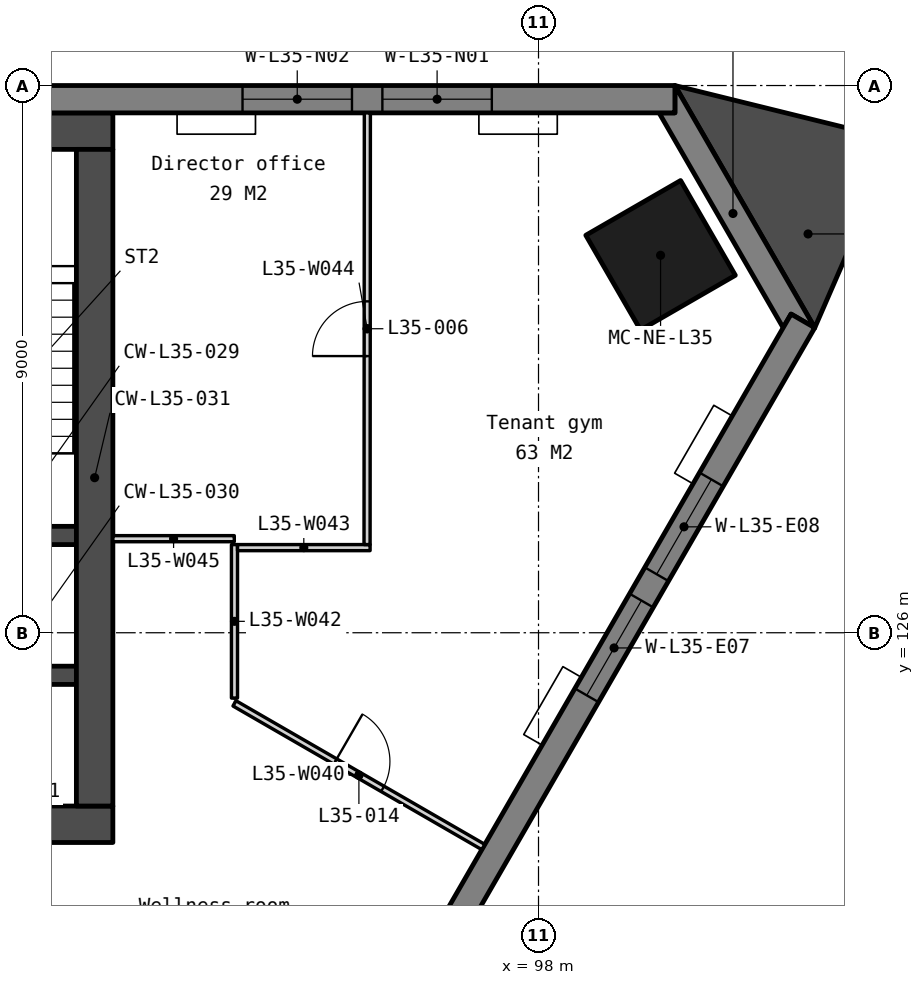
"""IFC4 building model, lengths in metres.
Left out: names, types, materials, properties, quantities, classifications, styles, units other than length and angle.
Written with IfcOpenShell. Run it as: python <this file> out.ifc"""

import sys

from ifc_helpers import new_model, si_unit, direction, frame, frame_2d, origin, origin_2d, place, context, subcontext, project, spatial, polyline, rectangle, outline, extrude, element, fill, save


model = new_model("IFC4")
c1 = context("Model", 3, precision=1e-05, world=origin(), true_north=direction((0.0, 1.0)))
c2 = subcontext(c1, "Body", "Model", "MODEL_VIEW")
j1 = project(units=[si_unit("LENGTHUNIT", "METRE"), si_unit("PLANEANGLEUNIT", "RADIAN")], contexts=[c1])
p1 = place(None, origin())
s1 = spatial("IfcSite", under=j1, at=p1, CompositionType="ELEMENT")
p2 = place(p1, origin())
s2 = spatial("IfcBuilding", under=s1, at=p2, CompositionType="ELEMENT")
p3 = place(p2, frame((0.0, 0.0, 140.3)))
s3 = spatial("IfcBuildingStorey", under=s2, at=p3, CompositionType="ELEMENT", Elevation=140.3)
p4 = place(p3, frame((100.007, 132.208, 0.0), z_axis=(0.0, 0.0, 1.0), x_axis=(-0.5, 0.866025403784, 0.0)))
e1 = element("IfcColumn", 1, at=p4, inside=s3, PredefinedType="COLUMN", context=c2, shape_type="SweptSolid", body=[
    extrude(rectangle(XDim=1.8, YDim=1.8, at=origin_2d()), origin(), (0.0, 0.0, 1.0), 3.9),
])
p5 = place(p3, frame((69.0, 134.25, 0.0), z_axis=(0.0, 0.0, 1.0), x_axis=(1.0, 0.0, 0.0)))
e2 = element("IfcWall", 2, at=p5, inside=s3, PredefinedType="SOLIDWALL", context=c2, shape_type="SweptSolid", body=[
    extrude(rectangle(XDim=22.0, YDim=0.6, at=frame_2d((11.0, 0.0))), origin(), (0.0, 0.0, 1.0), 3.75),
])
p6 = place(p3, frame((69.0, 122.85, 0.0), z_axis=(0.0, 0.0, 1.0), x_axis=(1.0, 0.0, 0.0)))
e3 = element("IfcWall", 3, at=p6, inside=s3, PredefinedType="SOLIDWALL", context=c2, shape_type="SweptSolid", body=[
    extrude(rectangle(XDim=22.0, YDim=0.6, at=frame_2d((11.0, 0.0))), origin(), (0.0, 0.0, 1.0), 3.75),
])
p7 = place(p6, frame((16.375, 0.0, 0.0)))
e4 = element("IfcOpeningElement", 4, at=p7, cuts=e3, PredefinedType="OPENING", context=c2, shape_type="SweptSolid", body=[
    extrude(rectangle(XDim=1.8, YDim=2.1, at=frame_2d((0.9, 1.05))), frame((0.0, 0.31, 0.0), z_axis=(0.0, -1.0, 0.0), x_axis=(1.0, 0.0, 0.0)), (0.0, 0.0, 1.0), 0.62),
])
p8 = place(p6, frame((3.825, 0.0, 0.0)))
e5 = element("IfcOpeningElement", 5, at=p8, cuts=e3, PredefinedType="OPENING", context=c2, shape_type="SweptSolid", body=[
    extrude(rectangle(XDim=1.8, YDim=2.1, at=frame_2d((0.9, 1.05))), frame((0.0, 0.31, 0.0), z_axis=(0.0, -1.0, 0.0), x_axis=(1.0, 0.0, 0.0)), (0.0, 0.0, 1.0), 0.62),
])
p9 = place(p6, frame((12.85, 0.0, 0.0)))
e6 = element("IfcOpeningElement", 6, at=p9, cuts=e3, PredefinedType="OPENING", context=c2, shape_type="SweptSolid", body=[
    extrude(rectangle(XDim=1.5, YDim=2.1, at=frame_2d((0.75, 1.05))), frame((0.0, 0.31, 0.0), z_axis=(0.0, -1.0, 0.0), x_axis=(1.0, 0.0, 0.0)), (0.0, 0.0, 1.0), 0.62),
])
for number, where, z_axis, x_axis in (
    (7, (87.85, 127.6, 0.0), (0.0, 0.0, 1.0), (1.0, 0.0, 0.0)),
    (8, (87.85, 125.3, 0.0), (0.0, 0.0, 1.0), (1.0, 0.0, 0.0)),
):
    element("IfcWall", number, at=place(p3, frame(where, z_axis=z_axis, x_axis=x_axis)), inside=s3, PredefinedType="SOLIDWALL", context=c2, shape_type="SweptSolid", body=[
        extrude(rectangle(XDim=2.55, YDim=0.3, at=frame_2d((1.275, 0.0))), origin(), (0.0, 0.0, 1.0), 3.75),
    ])
p10 = place(p3, frame((90.7, 133.95, 0.0), z_axis=(0.0, 0.0, 1.0), x_axis=(0.0, -1.0, 0.0)))
e9 = element("IfcWall", 9, at=p10, inside=s3, PredefinedType="SOLIDWALL", context=c2, shape_type="SweptSolid", body=[
    extrude(rectangle(XDim=10.8, YDim=0.6, at=frame_2d((5.4, 0.0))), origin(), (0.0, 0.0, 1.0), 3.75),
])
p11 = place(p3, frame((0.0, 0.0, -0.15)))
e10 = element("IfcWall", 10, at=p11, inside=s3, PredefinedType="SOLIDWALL", context=c2, shape_type="SweptSolid", body=[
    extrude(outline(polyline([(102.543, 131.016), (102.153, 131.241), (102.023, 131.016), (99.983, 134.55), (100.243, 134.55), (100.243, 135.0), (102.543, 131.016)])), origin(), (0.0, 0.0, 1.0), 3.9),
])
p12 = place(p3, frame((100.243, 134.775, -0.15), z_axis=(0.0, 0.0, 1.0), x_axis=(-1.0, 0.0, 0.0)))
e11 = element("IfcWall", 11, at=p12, inside=s3, PredefinedType="SOLIDWALL", context=c2, shape_type="SweptSolid", body=[
    extrude(outline(polyline([(0.0, 0.0), (0.0, 3.9), (33.425, 3.9), (33.425, 0.0), (0.0, 0.0)])), frame((0.0, 0.225, 0.0), z_axis=(0.0, -1.0, 0.0), x_axis=(1.0, 0.0, 0.0)), (0.0, 0.0, 1.0), 0.45),
])
p13 = place(p12, frame((3.011, 0.0, 0.95)))
e12 = element("IfcOpeningElement", 12, at=p13, cuts=e11, PredefinedType="OPENING", context=c2, shape_type="SweptSolid", body=[
    extrude(rectangle(XDim=1.8, YDim=2.2, at=frame_2d((0.9, 1.1))), frame((0.0, 0.235, 0.0), z_axis=(0.0, -1.0, 0.0), x_axis=(1.0, 0.0, 0.0)), (0.0, 0.0, 1.0), 0.47),
])
p14 = place(p12, frame((5.311, 0.0, 0.95)))
e13 = element("IfcOpeningElement", 13, at=p14, cuts=e11, PredefinedType="OPENING", context=c2, shape_type="SweptSolid", body=[
    extrude(rectangle(XDim=1.8, YDim=2.2, at=frame_2d((0.9, 1.1))), frame((0.0, 0.235, 0.0), z_axis=(0.0, -1.0, 0.0), x_axis=(1.0, 0.0, 0.0)), (0.0, 0.0, 1.0), 0.47),
])
p15 = place(p12, frame((13.132, 0.0, 0.95)))
e14 = element("IfcOpeningElement", 14, at=p15, cuts=e11, PredefinedType="OPENING", context=c2, shape_type="SweptSolid", body=[
    extrude(rectangle(XDim=1.8, YDim=2.2, at=frame_2d((0.9, 1.1))), frame((0.0, 0.235, 0.0), z_axis=(0.0, -1.0, 0.0), x_axis=(1.0, 0.0, 0.0)), (0.0, 0.0, 1.0), 0.47),
])
p16 = place(p12, frame((15.432, 0.0, 0.95)))
e15 = element("IfcOpeningElement", 15, at=p16, cuts=e11, PredefinedType="OPENING", context=c2, shape_type="SweptSolid", body=[
    extrude(rectangle(XDim=1.8, YDim=2.2, at=frame_2d((0.9, 1.1))), frame((0.0, 0.235, 0.0), z_axis=(0.0, -1.0, 0.0), x_axis=(1.0, 0.0, 0.0)), (0.0, 0.0, 1.0), 0.47),
])
p17 = place(p12, frame((23.254, 0.0, 0.95)))
e16 = element("IfcOpeningElement", 16, at=p17, cuts=e11, PredefinedType="OPENING", context=c2, shape_type="SweptSolid", body=[
    extrude(rectangle(XDim=1.8, YDim=2.2, at=frame_2d((0.9, 1.1))), frame((0.0, 0.235, 0.0), z_axis=(0.0, -1.0, 0.0), x_axis=(1.0, 0.0, 0.0)), (0.0, 0.0, 1.0), 0.47),
])
p18 = place(p12, frame((25.554, 0.0, 0.95)))
e17 = element("IfcOpeningElement", 17, at=p18, cuts=e11, PredefinedType="OPENING", context=c2, shape_type="SweptSolid", body=[
    extrude(rectangle(XDim=1.8, YDim=2.2, at=frame_2d((0.9, 1.1))), frame((0.0, 0.235, 0.0), z_axis=(0.0, -1.0, 0.0), x_axis=(1.0, 0.0, 0.0)), (0.0, 0.0, 1.0), 0.47),
])
p19 = place(p3, frame((82.105, 96.067, -0.15), z_axis=(0.0, 0.0, 1.0), x_axis=(0.499997369791, 0.866026922331, 0.0)))
e18 = element("IfcWall", 18, at=p19, inside=s3, PredefinedType="SOLIDWALL", context=c2, shape_type="SweptSolid", body=[
    extrude(outline(polyline([(40.486, 0.0), (40.486, 3.9), (0.0, 3.9), (0.0, 0.0), (40.486, 0.0)])), frame((0.0, 0.225, 0.0), z_axis=(0.0, -1.0, 0.0), x_axis=(1.0, 0.0, 0.0)), (0.0, 0.0, 1.0), 0.45),
])
p20 = place(p19, frame((3.011, 0.0, 0.95)))
e19 = element("IfcOpeningElement", 19, at=p20, cuts=e18, PredefinedType="OPENING", context=c2, shape_type="SweptSolid", body=[
    extrude(rectangle(XDim=1.8, YDim=2.2, at=frame_2d((0.9, 1.1))), frame((0.0, 0.235, 0.0), z_axis=(0.0, -1.0, 0.0), x_axis=(1.0, 0.0, 0.0)), (0.0, 0.0, 1.0), 0.47),
])
p21 = place(p19, frame((5.311, 0.0, 0.95)))
e20 = element("IfcOpeningElement", 20, at=p21, cuts=e18, PredefinedType="OPENING", context=c2, shape_type="SweptSolid", body=[
    extrude(rectangle(XDim=1.8, YDim=2.2, at=frame_2d((0.9, 1.1))), frame((0.0, 0.235, 0.0), z_axis=(0.0, -1.0, 0.0), x_axis=(1.0, 0.0, 0.0)), (0.0, 0.0, 1.0), 0.47),
])
p22 = place(p19, frame((13.132, 0.0, 0.95)))
e21 = element("IfcOpeningElement", 21, at=p22, cuts=e18, PredefinedType="OPENING", context=c2, shape_type="SweptSolid", body=[
    extrude(rectangle(XDim=1.8, YDim=2.2, at=frame_2d((0.9, 1.1))), frame((0.0, 0.235, 0.0), z_axis=(0.0, -1.0, 0.0), x_axis=(1.0, 0.0, 0.0)), (0.0, 0.0, 1.0), 0.47),
])
p23 = place(p19, frame((15.432, 0.0, 0.95)))
e22 = element("IfcOpeningElement", 22, at=p23, cuts=e18, PredefinedType="OPENING", context=c2, shape_type="SweptSolid", body=[
    extrude(rectangle(XDim=1.8, YDim=2.2, at=frame_2d((0.9, 1.1))), frame((0.0, 0.235, 0.0), z_axis=(0.0, -1.0, 0.0), x_axis=(1.0, 0.0, 0.0)), (0.0, 0.0, 1.0), 0.47),
])
p24 = place(p19, frame((23.254, 0.0, 0.95)))
e23 = element("IfcOpeningElement", 23, at=p24, cuts=e18, PredefinedType="OPENING", context=c2, shape_type="SweptSolid", body=[
    extrude(rectangle(XDim=1.8, YDim=2.2, at=frame_2d((0.9, 1.1))), frame((0.0, 0.235, 0.0), z_axis=(0.0, -1.0, 0.0), x_axis=(1.0, 0.0, 0.0)), (0.0, 0.0, 1.0), 0.47),
])
p25 = place(p19, frame((25.554, 0.0, 0.95)))
e24 = element("IfcOpeningElement", 24, at=p25, cuts=e18, PredefinedType="OPENING", context=c2, shape_type="SweptSolid", body=[
    extrude(rectangle(XDim=1.8, YDim=2.2, at=frame_2d((0.9, 1.1))), frame((0.0, 0.235, 0.0), z_axis=(0.0, -1.0, 0.0), x_axis=(1.0, 0.0, 0.0)), (0.0, 0.0, 1.0), 0.47),
])
p26 = place(p19, frame((33.375, 0.0, 0.95)))
e25 = element("IfcOpeningElement", 25, at=p26, cuts=e18, PredefinedType="OPENING", context=c2, shape_type="SweptSolid", body=[
    extrude(rectangle(XDim=1.8, YDim=2.2, at=frame_2d((0.9, 1.1))), frame((0.0, 0.235, 0.0), z_axis=(0.0, -1.0, 0.0), x_axis=(1.0, 0.0, 0.0)), (0.0, 0.0, 1.0), 0.47),
])
p27 = place(p19, frame((35.675, 0.0, 0.95)))
e26 = element("IfcOpeningElement", 26, at=p27, cuts=e18, PredefinedType="OPENING", context=c2, shape_type="SweptSolid", body=[
    extrude(rectangle(XDim=1.8, YDim=2.2, at=frame_2d((0.9, 1.1))), frame((0.0, 0.235, 0.0), z_axis=(0.0, -1.0, 0.0), x_axis=(1.0, 0.0, 0.0)), (0.0, 0.0, 1.0), 0.47),
])
p28 = place(p3, frame((0.0, 0.0, -0.15)))
e27 = element("IfcWall", 27, at=p28, inside=s3, PredefinedType="SOLIDWALL", context=c2, shape_type="SweptSolid", body=[
    extrude(outline(polyline([(102.543, 131.016), (103.884, 134.102), (100.243, 135.0), (102.543, 131.016)])), origin(), (0.0, 0.0, 1.0), 3.9),
])
p29 = place(p3, frame((93.0, 124.839, 0.0), z_axis=(0.0, 0.0, 1.0), x_axis=(0.866028145587, -0.499995251029, 0.0)))
e28 = element("IfcWall", 28, at=p29, inside=s3, PredefinedType="PARTITIONING", context=c2, shape_type="SweptSolid", body=[
    extrude(rectangle(XDim=4.726, YDim=0.1, at=frame_2d((2.363, 0.0))), origin(), (0.0, 0.0, 1.0), 3.75),
])
p30 = place(p29, frame((1.913, 0.0, 0.0)))
e29 = element("IfcOpeningElement", 29, at=p30, cuts=e28, PredefinedType="OPENING", context=c2, shape_type="SweptSolid", body=[
    extrude(rectangle(XDim=0.9, YDim=2.1, at=frame_2d((0.45, 1.05))), frame((0.0, 0.06, 0.0), z_axis=(0.0, -1.0, 0.0), x_axis=(1.0, 0.0, 0.0)), (0.0, 0.0, 1.0), 0.12),
])
p31 = place(p3, frame((93.0, 124.925, 0.0), z_axis=(0.0, 0.0, 1.0), x_axis=(0.0, 1.0, 0.0)))
e30 = element("IfcWall", 30, at=p31, inside=s3, PredefinedType="PARTITIONING", context=c2, shape_type="SweptSolid", body=[
    extrude(rectangle(XDim=2.525, YDim=0.1, at=frame_2d((1.262, 0.0))), origin(), (0.0, 0.0, 1.0), 3.75),
])
p32 = place(p3, frame((93.05, 127.4, 0.0), z_axis=(0.0, 0.0, 1.0), x_axis=(1.0, 0.0, 0.0)))
e31 = element("IfcWall", 31, at=p32, inside=s3, PredefinedType="PARTITIONING", context=c2, shape_type="SweptSolid", body=[
    extrude(rectangle(XDim=2.18, YDim=0.1, at=frame_2d((1.09, 0.0))), origin(), (0.0, 0.0, 1.0), 3.75),
])
p33 = place(p3, frame((95.18, 127.45, 0.0), z_axis=(0.0, 0.0, 1.0), x_axis=(0.000687710449, 0.999999763527, 0.0)))
e32 = element("IfcWall", 32, at=p33, inside=s3, PredefinedType="PARTITIONING", context=c2, shape_type="SweptSolid", body=[
    extrude(rectangle(XDim=7.1, YDim=0.1, at=frame_2d((3.55, 0.0))), origin(), (0.0, 0.0, 1.0), 3.75),
])
p34 = place(p33, frame((3.1, 0.0, 0.0)))
e33 = element("IfcOpeningElement", 33, at=p34, cuts=e32, PredefinedType="OPENING", context=c2, shape_type="SweptSolid", body=[
    extrude(rectangle(XDim=0.9, YDim=2.1, at=frame_2d((0.45, 1.05))), frame((0.0, 0.06, 0.0), z_axis=(0.0, -1.0, 0.0), x_axis=(1.0, 0.0, 0.0)), (0.0, 0.0, 1.0), 0.12),
])
p35 = place(p3, frame((91.0, 127.547, 0.0), z_axis=(0.0, 0.0, 1.0), x_axis=(1.0, 0.0, 0.0)))
e34 = element("IfcWall", 34, at=p35, inside=s3, PredefinedType="PARTITIONING", context=c2, shape_type="SweptSolid", body=[
    extrude(rectangle(XDim=1.997, YDim=0.1, at=frame_2d((0.999, 0.0))), origin(), (0.0, 0.0, 1.0), 3.75),
])
p36 = place(p13, origin())
e35 = element("IfcWindow", 35, at=p36, inside=s3, PartitioningType="SINGLE_PANEL", PredefinedType="WINDOW", context=c2, shape_type="SweptSolid", body=[
    extrude(rectangle(XDim=1.8, YDim=2.2, at=frame_2d((0.9, 1.1))), frame((0.0, 0.03, 0.0), z_axis=(0.0, -1.0, 0.0), x_axis=(1.0, 0.0, 0.0)), (0.0, 0.0, 1.0), 0.06),
])
fill(e12, e35)
p37 = place(p14, origin())
e36 = element("IfcWindow", 36, at=p37, inside=s3, PartitioningType="SINGLE_PANEL", PredefinedType="WINDOW", context=c2, shape_type="SweptSolid", body=[
    extrude(rectangle(XDim=1.8, YDim=2.2, at=frame_2d((0.9, 1.1))), frame((0.0, 0.03, 0.0), z_axis=(0.0, -1.0, 0.0), x_axis=(1.0, 0.0, 0.0)), (0.0, 0.0, 1.0), 0.06),
])
fill(e13, e36)
p38 = place(p26, origin())
e37 = element("IfcWindow", 37, at=p38, inside=s3, PartitioningType="SINGLE_PANEL", PredefinedType="WINDOW", context=c2, shape_type="SweptSolid", body=[
    extrude(rectangle(XDim=1.8, YDim=2.2, at=frame_2d((0.9, 1.1))), frame((0.0, 0.03, 0.0), z_axis=(0.0, -1.0, 0.0), x_axis=(1.0, 0.0, 0.0)), (0.0, 0.0, 1.0), 0.06),
])
fill(e25, e37)
p39 = place(p27, origin())
e38 = element("IfcWindow", 38, at=p39, inside=s3, PartitioningType="SINGLE_PANEL", PredefinedType="WINDOW", context=c2, shape_type="SweptSolid", body=[
    extrude(rectangle(XDim=1.8, YDim=2.2, at=frame_2d((0.9, 1.1))), frame((0.0, 0.03, 0.0), z_axis=(0.0, -1.0, 0.0), x_axis=(1.0, 0.0, 0.0)), (0.0, 0.0, 1.0), 0.06),
])
fill(e26, e38)
p40 = place(p34, origin())
e39 = element("IfcDoor", 39, at=p40, inside=s3, OperationType="SINGLE_SWING_LEFT", PredefinedType="DOOR", context=c2, shape_type="SweptSolid", body=[
    extrude(rectangle(XDim=0.9, YDim=2.1, at=frame_2d((0.45, 1.05))), frame((0.0, 0.025, 0.0), z_axis=(0.0, -1.0, 0.0), x_axis=(1.0, 0.0, 0.0)), (0.0, 0.0, 1.0), 0.05),
])
fill(e33, e39)
p41 = place(p30, origin())
e40 = element("IfcDoor", 40, at=p41, inside=s3, OperationType="SINGLE_SWING_LEFT", PredefinedType="DOOR", context=c2, shape_type="SweptSolid", body=[
    extrude(rectangle(XDim=0.9, YDim=2.1, at=frame_2d((0.45, 1.05))), frame((0.0, 0.025, 0.0), z_axis=(0.0, -1.0, 0.0), x_axis=(1.0, 0.0, 0.0)), (0.0, 0.0, 1.0), 0.05),
])
fill(e29, e40)
save(model, sys.argv[1])
